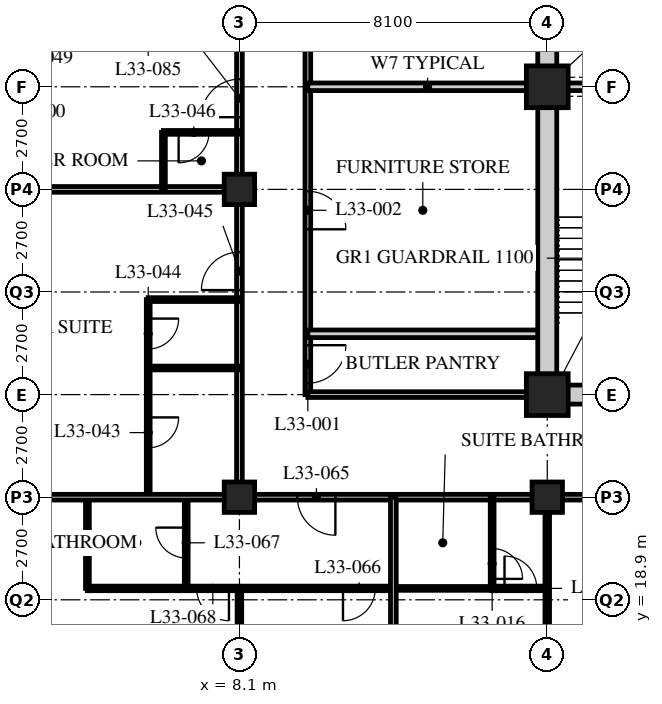
"""IFC4 building model, lengths in metres.
Left out: names, types, materials, properties, quantities, classifications, styles, units other than length and angle.
Written with IfcOpenShell. Run it as: python <this file> out.ifc"""

import sys

from ifc_helpers import new_model, si_unit, direction, frame, frame_2d, origin, origin_2d, place, context, subcontext, project, spatial, rectangle, hollow_rectangle, extrude, element, fill, save


model = new_model("IFC4")
c1 = context("Model", 3, precision=1e-05, world=origin(), true_north=direction((0.0, 1.0)))
c2 = subcontext(c1, "Body", "Model", "MODEL_VIEW")
j1 = project(units=[si_unit("LENGTHUNIT", "METRE"), si_unit("PLANEANGLEUNIT", "RADIAN")], contexts=[c1])
p1 = place(None, origin())
s1 = spatial("IfcSite", under=j1, at=p1, CompositionType="ELEMENT")
p2 = place(p1, origin())
s2 = spatial("IfcBuilding", under=s1, at=p2, CompositionType="ELEMENT")
p3 = place(p2, frame((0.0, 0.0, 130.6)))
s3 = spatial("IfcBuildingStorey", under=s2, at=p3, CompositionType="ELEMENT", Elevation=130.6)
for number, where, z_axis, x_axis in (
    (1, (8.1, 21.6, 0.0), (0.0, 0.0, 1.0), (1.0, 0.0, 0.0)),
    (2, (8.1, 29.7, 0.0), (0.0, 0.0, 1.0), (1.0, 0.0, 0.0)),
    (3, (16.2, 21.6, 0.0), (0.0, 0.0, 1.0), (1.0, 0.0, 0.0)),
):
    element("IfcColumn", number, at=place(p3, frame(where, z_axis=z_axis, x_axis=x_axis)), inside=s3, PredefinedType="COLUMN", context=c2, shape_type="SweptSolid", body=[
        extrude(hollow_rectangle(XDim=0.8, YDim=0.8, WallThickness=0.08, at=origin_2d()), origin(), (0.0, 0.0, 1.0), 3.4),
    ])
for number, where, z_axis, x_axis in (
    (4, (16.2, 24.3, 0.0), (0.0, 0.0, 1.0), (1.0, 0.0, 0.0)),
    (5, (16.2, 32.4, 0.0), (0.0, 0.0, 1.0), (1.0, 0.0, 0.0)),
):
    element("IfcColumn", number, at=place(p3, frame(where, z_axis=z_axis, x_axis=x_axis)), inside=s3, PredefinedType="COLUMN", context=c2, shape_type="SweptSolid", body=[
        extrude(hollow_rectangle(XDim=1.1, YDim=1.1, WallThickness=0.1, at=origin_2d()), origin(), (0.0, 0.0, 1.0), 3.4),
    ])
p4 = place(p3, frame((8.1, 21.6, 0.0), z_axis=(0.0, 0.0, 1.0), x_axis=(1.0, 0.0, 0.0)))
e6 = element("IfcWall", 6, at=p4, inside=s3, PredefinedType="PARTITIONING", context=c2, shape_type="SweptSolid", body=[
    extrude(rectangle(XDim=40.5, YDim=0.15, at=frame_2d((20.25, 0.0))), origin(), (0.0, 0.0, 1.0), 2.578),
])
p5 = place(p4, frame((9.625, 0.0, 0.0)))
e7 = element("IfcOpeningElement", 7, at=p5, cuts=e6, PredefinedType="OPENING", context=c2, shape_type="SweptSolid", body=[
    extrude(rectangle(XDim=1.0, YDim=2.1, at=frame_2d((0.5, 1.05))), frame((0.0, 0.085, 0.0), z_axis=(0.0, -1.0, 0.0), x_axis=(1.0, 0.0, 0.0)), (0.0, 0.0, 1.0), 0.17),
])
p6 = place(p4, frame((21.775, 0.0, 0.0)))
e8 = element("IfcOpeningElement", 8, at=p6, cuts=e6, PredefinedType="OPENING", context=c2, shape_type="SweptSolid", body=[
    extrude(rectangle(XDim=1.0, YDim=2.1, at=frame_2d((0.5, 1.05))), frame((0.0, 0.085, 0.0), z_axis=(0.0, -1.0, 0.0), x_axis=(1.0, 0.0, 0.0)), (0.0, 0.0, 1.0), 0.17),
])
p7 = place(p4, frame((28.95, 0.0, 0.0)))
e9 = element("IfcOpeningElement", 9, at=p7, cuts=e6, PredefinedType="OPENING", context=c2, shape_type="SweptSolid", body=[
    extrude(rectangle(XDim=1.0, YDim=2.1, at=frame_2d((0.5, 1.05))), frame((0.0, 0.085, 0.0), z_axis=(0.0, -1.0, 0.0), x_axis=(1.0, 0.0, 0.0)), (0.0, 0.0, 1.0), 0.17),
])
p8 = place(p4, frame((34.85, 0.0, 0.0)))
e10 = element("IfcOpeningElement", 10, at=p8, cuts=e6, PredefinedType="OPENING", context=c2, shape_type="SweptSolid", body=[
    extrude(rectangle(XDim=1.0, YDim=2.1, at=frame_2d((0.5, 1.05))), frame((0.0, 0.085, 0.0), z_axis=(0.0, -1.0, 0.0), x_axis=(1.0, 0.0, 0.0)), (0.0, 0.0, 1.0), 0.17),
])
p9 = place(p4, frame((1.525, 0.0, 0.0)))
e11 = element("IfcOpeningElement", 11, at=p9, cuts=e6, PredefinedType="OPENING", context=c2, shape_type="SweptSolid", body=[
    extrude(rectangle(XDim=1.0, YDim=2.1, at=frame_2d((0.5, 1.05))), frame((0.0, 0.085, 0.0), z_axis=(0.0, -1.0, 0.0), x_axis=(1.0, 0.0, 0.0)), (0.0, 0.0, 1.0), 0.17),
])
p10 = place(p4, frame((37.975, 0.0, 0.0)))
e12 = element("IfcOpeningElement", 12, at=p10, cuts=e6, PredefinedType="OPENING", context=c2, shape_type="SweptSolid", body=[
    extrude(rectangle(XDim=1.0, YDim=2.1, at=frame_2d((0.5, 1.05))), frame((0.0, 0.085, 0.0), z_axis=(0.0, -1.0, 0.0), x_axis=(1.0, 0.0, 0.0)), (0.0, 0.0, 1.0), 0.17),
])
p11 = place(p3, frame((8.1, 21.6, 0.0), z_axis=(0.0, 0.0, 1.0), x_axis=(0.0, 1.0, 0.0)))
e13 = element("IfcWall", 13, at=p11, inside=s3, PredefinedType="PARTITIONING", context=c2, shape_type="SweptSolid", body=[
    extrude(rectangle(XDim=24.3, YDim=0.15, at=frame_2d((12.15, 0.0))), origin(), (0.0, 0.0, 1.0), 2.578),
])
p12 = place(p11, frame((5.45, 0.0, 0.0)))
e14 = element("IfcOpeningElement", 14, at=p12, cuts=e13, PredefinedType="OPENING", context=c2, shape_type="SweptSolid", body=[
    extrude(rectangle(XDim=1.0, YDim=2.1, at=frame_2d((0.5, 1.05))), frame((0.0, 0.085, 0.0), z_axis=(0.0, -1.0, 0.0), x_axis=(1.0, 0.0, 0.0)), (0.0, 0.0, 1.0), 0.17),
])
p13 = place(p11, frame((10.0, 0.0, 0.0)))
e15 = element("IfcOpeningElement", 15, at=p13, cuts=e13, PredefinedType="OPENING", context=c2, shape_type="SweptSolid", body=[
    extrude(rectangle(XDim=1.0, YDim=2.1, at=frame_2d((0.5, 1.05))), frame((0.0, 0.085, 0.0), z_axis=(0.0, -1.0, 0.0), x_axis=(1.0, 0.0, 0.0)), (0.0, 0.0, 1.0), 0.17),
])
p14 = place(p11, frame((21.65, 0.0, 0.0)))
e16 = element("IfcOpeningElement", 16, at=p14, cuts=e13, PredefinedType="OPENING", context=c2, shape_type="SweptSolid", body=[
    extrude(rectangle(XDim=1.0, YDim=2.1, at=frame_2d((0.5, 1.05))), frame((0.0, 0.085, 0.0), z_axis=(0.0, -1.0, 0.0), x_axis=(1.0, 0.0, 0.0)), (0.0, 0.0, 1.0), 0.17),
])
p15 = place(p3, frame((9.9, 44.1, 0.0), z_axis=(0.0, 0.0, 1.0), x_axis=(0.0, -1.0, 0.0)))
e17 = element("IfcWall", 17, at=p15, inside=s3, PredefinedType="PARTITIONING", context=c2, shape_type="SweptSolid", body=[
    extrude(rectangle(XDim=19.8, YDim=0.15, at=frame_2d((9.9, 0.0))), origin(), (0.0, 0.0, 1.0), 3.19),
])
p16 = place(p15, frame((18.5, 0.0, 0.0)))
e18 = element("IfcOpeningElement", 18, at=p16, cuts=e17, PredefinedType="OPENING", context=c2, shape_type="SweptSolid", body=[
    extrude(rectangle(XDim=1.0, YDim=2.1, at=frame_2d((0.5, 1.05))), frame((0.0, 0.085, 0.0), z_axis=(0.0, -1.0, 0.0), x_axis=(1.0, 0.0, 0.0)), (0.0, 0.0, 1.0), 0.17),
])
p17 = place(p15, frame((14.45, 0.0, 0.0)))
e19 = element("IfcOpeningElement", 19, at=p17, cuts=e17, PredefinedType="OPENING", context=c2, shape_type="SweptSolid", body=[
    extrude(rectangle(XDim=1.0, YDim=2.1, at=frame_2d((0.5, 1.05))), frame((0.0, 0.085, 0.0), z_axis=(0.0, -1.0, 0.0), x_axis=(1.0, 0.0, 0.0)), (0.0, 0.0, 1.0), 0.17),
])
p18 = place(p15, frame((7.15, 0.0, 0.0)))
e20 = element("IfcOpeningElement", 20, at=p18, cuts=e17, PredefinedType="OPENING", context=c2, shape_type="SweptSolid", body=[
    extrude(rectangle(XDim=1.0, YDim=2.1, at=frame_2d((0.5, 1.05))), frame((0.0, 0.085, 0.0), z_axis=(0.0, -1.0, 0.0), x_axis=(1.0, 0.0, 0.0)), (0.0, 0.0, 1.0), 0.17),
])
p19 = place(p3, frame((9.9, 24.3, 0.0), z_axis=(0.0, 0.0, 1.0), x_axis=(1.0, 0.0, 0.0)))
e21 = element("IfcWall", 21, at=p19, inside=s3, PredefinedType="PARTITIONING", context=c2, shape_type="SweptSolid", body=[
    extrude(rectangle(XDim=6.1, YDim=0.15, at=frame_2d((3.05, 0.0))), origin(), (0.0, 0.0, 1.0), 3.19),
])
for number, where, z_axis, x_axis in (
    (22, (9.9, 32.4, 0.0), (0.0, 0.0, 1.0), (1.0, 0.0, 0.0)),
    (23, (9.9, 25.9, 0.0), (0.0, 0.0, 1.0), (1.0, 0.0, 0.0)),
):
    element("IfcWall", number, at=place(p3, frame(where, z_axis=z_axis, x_axis=x_axis)), inside=s3, PredefinedType="SOLIDWALL", context=c2, shape_type="SweptSolid", body=[
        extrude(rectangle(XDim=6.3, YDim=0.2, at=frame_2d((3.15, 0.0))), origin(), (0.0, 0.0, 1.0), 3.19),
    ])
p20 = place(p3, frame((12.15, 19.2, 0.0), z_axis=(0.0, 0.0, 1.0), x_axis=(1.0, 0.0, 0.0)))
e24 = element("IfcWall", 24, at=p20, inside=s3, PredefinedType="PARTITIONING", context=c2, shape_type="SweptSolid", body=[
    extrude(rectangle(XDim=2.6, YDim=0.1, at=frame_2d((1.3, 0.0))), origin(), (0.0, 0.0, 1.0), 3.19),
])
p21 = place(p3, frame((14.75, 21.6, 0.0), z_axis=(0.0, 0.0, 1.0), x_axis=(0.0, -1.0, 0.0)))
e25 = element("IfcWall", 25, at=p21, inside=s3, PredefinedType="PARTITIONING", context=c2, shape_type="SweptSolid", body=[
    extrude(rectangle(XDim=2.4, YDim=0.1, at=frame_2d((1.2, 0.0))), origin(), (0.0, 0.0, 1.0), 3.19),
])
p22 = place(p21, frame((1.35, 0.0, 0.0)))
e26 = element("IfcOpeningElement", 26, at=p22, cuts=e25, PredefinedType="OPENING", context=c2, shape_type="SweptSolid", body=[
    extrude(rectangle(XDim=0.8, YDim=2.1, at=frame_2d((0.4, 1.05))), frame((0.0, 0.06, 0.0), z_axis=(0.0, -1.0, 0.0), x_axis=(1.0, 0.0, 0.0)), (0.0, 0.0, 1.0), 0.12),
])
p23 = place(p3, frame((16.2, 21.6, 0.0), z_axis=(0.0, 0.0, 1.0), x_axis=(0.0, -1.0, 0.0)))
e27 = element("IfcWall", 27, at=p23, inside=s3, PredefinedType="PARTITIONING", context=c2, shape_type="SweptSolid", body=[
    extrude(rectangle(XDim=15.9, YDim=0.12, at=frame_2d((7.95, 0.0))), origin(), (0.0, 0.0, 1.0), 2.578),
])
p24 = place(p23, frame((8.875, 0.0, 0.0)))
e28 = element("IfcOpeningElement", 28, at=p24, cuts=e27, PredefinedType="OPENING", context=c2, shape_type="SweptSolid", body=[
    extrude(rectangle(XDim=0.85, YDim=2.1, at=frame_2d((0.425, 1.05))), frame((0.0, 0.07, 0.0), z_axis=(0.0, -1.0, 0.0), x_axis=(1.0, 0.0, 0.0)), (0.0, 0.0, 1.0), 0.14),
])
p25 = place(p3, frame((5.7, 21.6, 0.0), z_axis=(0.0, 0.0, 1.0), x_axis=(0.0, 1.0, 0.0)))
e29 = element("IfcWall", 29, at=p25, inside=s3, PredefinedType="PARTITIONING", context=c2, shape_type="SweptSolid", body=[
    extrude(rectangle(XDim=5.2, YDim=0.1, at=frame_2d((2.6, 0.0))), origin(), (0.0, 0.0, 1.0), 3.19),
])
p26 = place(p25, frame((1.3, 0.0, 0.0)))
e30 = element("IfcOpeningElement", 30, at=p26, cuts=e29, PredefinedType="OPENING", context=c2, shape_type="SweptSolid", body=[
    extrude(rectangle(XDim=0.8, YDim=2.1, at=frame_2d((0.4, 1.05))), frame((0.0, 0.06, 0.0), z_axis=(0.0, -1.0, 0.0), x_axis=(1.0, 0.0, 0.0)), (0.0, 0.0, 1.0), 0.12),
])
p27 = place(p25, frame((3.9, 0.0, 0.0)))
e31 = element("IfcOpeningElement", 31, at=p27, cuts=e29, PredefinedType="OPENING", context=c2, shape_type="SweptSolid", body=[
    extrude(rectangle(XDim=0.8, YDim=2.1, at=frame_2d((0.4, 1.05))), frame((0.0, 0.06, 0.0), z_axis=(0.0, -1.0, 0.0), x_axis=(1.0, 0.0, 0.0)), (0.0, 0.0, 1.0), 0.12),
])
for number, where, z_axis, x_axis in (
    (32, (8.1, 25.0, 0.0), (0.0, 0.0, 1.0), (-1.0, 0.0, 0.0)),
    (33, (8.1, 26.8, 0.0), (0.0, 0.0, 1.0), (-1.0, 0.0, 0.0)),
):
    element("IfcWall", number, at=place(p3, frame(where, z_axis=z_axis, x_axis=x_axis)), inside=s3, PredefinedType="PARTITIONING", context=c2, shape_type="SweptSolid", body=[
        extrude(rectangle(XDim=2.4, YDim=0.1, at=frame_2d((1.2, 0.0))), origin(), (0.0, 0.0, 1.0), 3.19),
    ])
p28 = place(p3, frame((8.1, 29.7, 0.0), z_axis=(0.0, 0.0, 1.0), x_axis=(-1.0, 0.0, 0.0)))
e34 = element("IfcWall", 34, at=p28, inside=s3, PredefinedType="PARTITIONING", context=c2, shape_type="SweptSolid", body=[
    extrude(rectangle(XDim=7.8, YDim=0.15, at=frame_2d((3.9, 0.0))), origin(), (0.0, 0.0, 1.0), 2.578),
])
p29 = place(p3, frame((6.1, 29.7, 0.0), z_axis=(0.0, 0.0, 1.0), x_axis=(0.0, 1.0, 0.0)))
e35 = element("IfcWall", 35, at=p29, inside=s3, PredefinedType="PARTITIONING", context=c2, shape_type="SweptSolid", body=[
    extrude(rectangle(XDim=1.5, YDim=0.1, at=frame_2d((0.75, 0.0))), origin(), (0.0, 0.0, 1.0), 3.19),
])
p30 = place(p3, frame((8.1, 31.2, 0.0), z_axis=(0.0, 0.0, 1.0), x_axis=(-1.0, 0.0, 0.0)))
e36 = element("IfcWall", 36, at=p30, inside=s3, PredefinedType="PARTITIONING", context=c2, shape_type="SweptSolid", body=[
    extrude(rectangle(XDim=2.0, YDim=0.1, at=frame_2d((1.0, 0.0))), origin(), (0.0, 0.0, 1.0), 3.19),
])
p31 = place(p30, frame((0.8, 0.0, 0.0)))
e37 = element("IfcOpeningElement", 37, at=p31, cuts=e36, PredefinedType="OPENING", context=c2, shape_type="SweptSolid", body=[
    extrude(rectangle(XDim=0.8, YDim=2.1, at=frame_2d((0.4, 1.05))), frame((0.0, 0.06, 0.0), z_axis=(0.0, -1.0, 0.0), x_axis=(1.0, 0.0, 0.0)), (0.0, 0.0, 1.0), 0.12),
])
p32 = place(p3, frame((6.7, 21.6, 0.0), z_axis=(0.0, 0.0, 1.0), x_axis=(0.0, -1.0, 0.0)))
e38 = element("IfcWall", 38, at=p32, inside=s3, PredefinedType="PARTITIONING", context=c2, shape_type="SweptSolid", body=[
    extrude(rectangle(XDim=2.4, YDim=0.1, at=frame_2d((1.2, 0.0))), origin(), (0.0, 0.0, 1.0), 3.19),
])
p33 = place(p32, frame((0.8, 0.0, 0.0)))
e39 = element("IfcOpeningElement", 39, at=p33, cuts=e38, PredefinedType="OPENING", context=c2, shape_type="SweptSolid", body=[
    extrude(rectangle(XDim=0.8, YDim=2.1, at=frame_2d((0.4, 1.05))), frame((0.0, 0.06, 0.0), z_axis=(0.0, -1.0, 0.0), x_axis=(1.0, 0.0, 0.0)), (0.0, 0.0, 1.0), 0.12),
])
p34 = place(p3, frame((4.1, 21.6, 0.0), z_axis=(0.0, 0.0, 1.0), x_axis=(0.0, -1.0, 0.0)))
e40 = element("IfcWall", 40, at=p34, inside=s3, PredefinedType="PARTITIONING", context=c2, shape_type="SweptSolid", body=[
    extrude(rectangle(XDim=2.4, YDim=0.1, at=frame_2d((1.2, 0.0))), origin(), (0.0, 0.0, 1.0), 3.19),
])
p35 = place(p3, frame((4.1, 19.2, 0.0), z_axis=(0.0, 0.0, 1.0), x_axis=(1.0, 0.0, 0.0)))
e41 = element("IfcWall", 41, at=p35, inside=s3, PredefinedType="PARTITIONING", context=c2, shape_type="SweptSolid", body=[
    extrude(rectangle(XDim=8.05, YDim=0.12, at=frame_2d((4.025, 0.0))), origin(), (0.0, 0.0, 1.0), 3.19),
])
p36 = place(p35, frame((6.725, 0.0, 0.0)))
e42 = element("IfcOpeningElement", 42, at=p36, cuts=e41, PredefinedType="OPENING", context=c2, shape_type="SweptSolid", body=[
    extrude(rectangle(XDim=0.85, YDim=2.1, at=frame_2d((0.425, 1.05))), frame((0.0, 0.07, 0.0), z_axis=(0.0, -1.0, 0.0), x_axis=(1.0, 0.0, 0.0)), (0.0, 0.0, 1.0), 0.14),
])
p37 = place(p35, frame((2.875, 0.0, 0.0)))
e43 = element("IfcOpeningElement", 43, at=p37, cuts=e41, PredefinedType="OPENING", context=c2, shape_type="SweptSolid", body=[
    extrude(rectangle(XDim=0.85, YDim=2.1, at=frame_2d((0.425, 1.05))), frame((0.0, 0.07, 0.0), z_axis=(0.0, -1.0, 0.0), x_axis=(1.0, 0.0, 0.0)), (0.0, 0.0, 1.0), 0.14),
])
p38 = place(p3, frame((8.1, 19.2, 0.0), z_axis=(0.0, 0.0, 1.0), x_axis=(0.0, -1.0, 0.0)))
e44 = element("IfcWall", 44, at=p38, inside=s3, PredefinedType="PARTITIONING", context=c2, shape_type="SweptSolid", body=[
    extrude(rectangle(XDim=9.45, YDim=0.12, at=frame_2d((4.725, 0.0))), origin(), (0.0, 0.0, 1.0), 2.578),
])
p39 = place(p3, frame((0.3, 21.6, 0.0), z_axis=(0.0, 0.0, 1.0), x_axis=(1.0, 0.0, 0.0)))
e45 = element("IfcWall", 45, at=p39, inside=s3, PredefinedType="PARTITIONING", context=c2, shape_type="SweptSolid", body=[
    extrude(rectangle(XDim=7.8, YDim=0.15, at=frame_2d((3.9, 0.0))), origin(), (0.0, 0.0, 1.0), 2.578),
])
p40 = place(p3, frame((12.15, 21.6, 0.0), z_axis=(0.0, 0.0, 1.0), x_axis=(0.0, -1.0, 0.0)))
e46 = element("IfcWall", 46, at=p40, inside=s3, PredefinedType="PARTITIONING", context=c2, shape_type="SweptSolid", body=[
    extrude(rectangle(XDim=15.9, YDim=0.15, at=frame_2d((7.95, 0.0))), origin(), (0.0, 0.0, 1.0), 3.19),
])
p41 = place(p3, frame((16.2, 19.2, 0.0), z_axis=(0.0, 0.0, 1.0), x_axis=(-1.0, 0.0, 0.0)))
e47 = element("IfcWall", 47, at=p41, inside=s3, PredefinedType="PARTITIONING", context=c2, shape_type="SweptSolid", body=[
    extrude(rectangle(XDim=1.46, YDim=0.12, at=frame_2d((0.73, 0.0))), origin(), (0.0, 0.0, 1.0), 3.19),
])
p42 = place(p41, frame((0.275, 0.0, 0.0)))
e48 = element("IfcOpeningElement", 48, at=p42, cuts=e47, PredefinedType="OPENING", context=c2, shape_type="SweptSolid", body=[
    extrude(rectangle(XDim=0.85, YDim=2.1, at=frame_2d((0.425, 1.05))), frame((0.0, 0.07, 0.0), z_axis=(0.0, -1.0, 0.0), x_axis=(1.0, 0.0, 0.0)), (0.0, 0.0, 1.0), 0.14),
])
p43 = place(p3, frame((15.95, 24.3, 0.0), z_axis=(0.0, 0.0, 1.0), x_axis=(1.0, 0.0, 0.0)))
e49 = element("IfcWall", 49, at=p43, inside=s3, PredefinedType="SOLIDWALL", context=c2, shape_type="SweptSolid", body=[
    extrude(rectangle(XDim=24.8, YDim=0.5, at=frame_2d((12.4, 0.0))), origin(), (0.0, 0.0, 1.0), 2.54),
])
p44 = place(p43, frame((11.5, 0.0, 0.0)))
e50 = element("IfcOpeningElement", 50, at=p44, cuts=e49, PredefinedType="OPENING", context=c2, shape_type="SweptSolid", body=[
    extrude(rectangle(XDim=1.8, YDim=2.4, at=frame_2d((0.9, 1.2))), frame((0.0, 0.26, 0.0), z_axis=(0.0, -1.0, 0.0), x_axis=(1.0, 0.0, 0.0)), (0.0, 0.0, 1.0), 0.52),
])
p45 = place(p3, frame((16.2, 24.55, 0.0), z_axis=(0.0, 0.0, 1.0), x_axis=(0.0, 1.0, 0.0)))
e51 = element("IfcWall", 51, at=p45, inside=s3, PredefinedType="SOLIDWALL", context=c2, shape_type="SweptSolid", body=[
    extrude(rectangle(XDim=15.7, YDim=0.5, at=frame_2d((7.85, 0.0))), origin(), (0.0, 0.0, 1.0), 2.578),
])
p46 = place(p3, frame((16.45, 32.4, 0.0), z_axis=(0.0, 0.0, 1.0), x_axis=(1.0, 0.0, 0.0)))
e52 = element("IfcWall", 52, at=p46, inside=s3, PredefinedType="SOLIDWALL", context=c2, shape_type="SweptSolid", body=[
    extrude(rectangle(XDim=7.95, YDim=0.2, at=frame_2d((3.975, 0.0))), origin(), (0.0, 0.0, 1.0), 2.578),
])
p47 = place(p16, origin())
e53 = element("IfcDoor", 53, at=p47, inside=s3, OperationType="SINGLE_SWING_LEFT", PredefinedType="DOOR", context=c2, shape_type="SweptSolid", body=[
    extrude(rectangle(XDim=1.0, YDim=2.1, at=frame_2d((0.5, 1.05))), frame((0.0, 0.025, 0.0), z_axis=(0.0, -1.0, 0.0), x_axis=(1.0, 0.0, 0.0)), (0.0, 0.0, 1.0), 0.05),
])
fill(e18, e53)
p48 = place(p17, origin())
e54 = element("IfcDoor", 54, at=p48, inside=s3, OperationType="SINGLE_SWING_RIGHT", PredefinedType="DOOR", context=c2, shape_type="SweptSolid", body=[
    extrude(rectangle(XDim=1.0, YDim=2.1, at=frame_2d((0.5, 1.05))), frame((0.0, 0.025, 0.0), z_axis=(0.0, -1.0, 0.0), x_axis=(1.0, 0.0, 0.0)), (0.0, 0.0, 1.0), 0.05),
])
fill(e19, e54)
p49 = place(p22, origin())
e55 = element("IfcDoor", 55, at=p49, inside=s3, OperationType="SINGLE_SWING_RIGHT", PredefinedType="DOOR", context=c2, shape_type="SweptSolid", body=[
    extrude(rectangle(XDim=0.8, YDim=2.1, at=frame_2d((0.4, 1.05))), frame((0.0, 0.025, 0.0), z_axis=(0.0, -1.0, 0.0), x_axis=(1.0, 0.0, 0.0)), (0.0, 0.0, 1.0), 0.05),
])
fill(e26, e55)
p50 = place(p26, origin())
e56 = element("IfcDoor", 56, at=p50, inside=s3, OperationType="SINGLE_SWING_LEFT", PredefinedType="DOOR", context=c2, shape_type="SweptSolid", body=[
    extrude(rectangle(XDim=0.8, YDim=2.1, at=frame_2d((0.4, 1.05))), frame((0.0, 0.025, 0.0), z_axis=(0.0, -1.0, 0.0), x_axis=(1.0, 0.0, 0.0)), (0.0, 0.0, 1.0), 0.05),
])
fill(e30, e56)
p51 = place(p27, origin())
e57 = element("IfcDoor", 57, at=p51, inside=s3, OperationType="SINGLE_SWING_LEFT", PredefinedType="DOOR", context=c2, shape_type="SweptSolid", body=[
    extrude(rectangle(XDim=0.8, YDim=2.1, at=frame_2d((0.4, 1.05))), frame((0.0, 0.025, 0.0), z_axis=(0.0, -1.0, 0.0), x_axis=(1.0, 0.0, 0.0)), (0.0, 0.0, 1.0), 0.05),
])
fill(e31, e57)
p52 = place(p12, origin())
e58 = element("IfcDoor", 58, at=p52, inside=s3, OperationType="SINGLE_SWING_LEFT", PredefinedType="DOOR", context=c2, shape_type="SweptSolid", body=[
    extrude(rectangle(XDim=1.0, YDim=2.1, at=frame_2d((0.5, 1.05))), frame((0.0, 0.025, 0.0), z_axis=(0.0, -1.0, 0.0), x_axis=(1.0, 0.0, 0.0)), (0.0, 0.0, 1.0), 0.05),
])
fill(e14, e58)
p53 = place(p31, origin())
e59 = element("IfcDoor", 59, at=p53, inside=s3, OperationType="SINGLE_SWING_RIGHT", PredefinedType="DOOR", context=c2, shape_type="SweptSolid", body=[
    extrude(rectangle(XDim=0.8, YDim=2.1, at=frame_2d((0.4, 1.05))), frame((0.0, 0.025, 0.0), z_axis=(0.0, -1.0, 0.0), x_axis=(1.0, 0.0, 0.0)), (0.0, 0.0, 1.0), 0.05),
])
fill(e37, e59)
p54 = place(p13, origin())
e60 = element("IfcDoor", 60, at=p54, inside=s3, OperationType="SINGLE_SWING_LEFT", PredefinedType="DOOR", context=c2, shape_type="SweptSolid", body=[
    extrude(rectangle(XDim=1.0, YDim=2.1, at=frame_2d((0.5, 1.05))), frame((0.0, 0.025, 0.0), z_axis=(0.0, -1.0, 0.0), x_axis=(1.0, 0.0, 0.0)), (0.0, 0.0, 1.0), 0.05),
])
fill(e15, e60)
p55 = place(p9, origin())
e61 = element("IfcDoor", 61, at=p55, inside=s3, OperationType="SINGLE_SWING_LEFT", PredefinedType="DOOR", context=c2, shape_type="SweptSolid", body=[
    extrude(rectangle(XDim=1.0, YDim=2.1, at=frame_2d((0.5, 1.05))), frame((0.0, 0.025, 0.0), z_axis=(0.0, -1.0, 0.0), x_axis=(1.0, 0.0, 0.0)), (0.0, 0.0, 1.0), 0.05),
])
fill(e11, e61)
p56 = place(p36, origin())
e62 = element("IfcDoor", 62, at=p56, inside=s3, OperationType="SINGLE_SWING_RIGHT", PredefinedType="DOOR", context=c2, shape_type="SweptSolid", body=[
    extrude(rectangle(XDim=0.85, YDim=2.1, at=frame_2d((0.425, 1.05))), frame((0.0, 0.025, 0.0), z_axis=(0.0, -1.0, 0.0), x_axis=(1.0, 0.0, 0.0)), (0.0, 0.0, 1.0), 0.05),
])
fill(e42, e62)
p57 = place(p33, origin())
e63 = element("IfcDoor", 63, at=p57, inside=s3, OperationType="SINGLE_SWING_RIGHT", PredefinedType="DOOR", context=c2, shape_type="SweptSolid", body=[
    extrude(rectangle(XDim=0.8, YDim=2.1, at=frame_2d((0.4, 1.05))), frame((0.0, 0.025, 0.0), z_axis=(0.0, -1.0, 0.0), x_axis=(1.0, 0.0, 0.0)), (0.0, 0.0, 1.0), 0.05),
])
fill(e39, e63)
p58 = place(p37, origin())
e64 = element("IfcDoor", 64, at=p58, inside=s3, OperationType="SINGLE_SWING_LEFT", PredefinedType="DOOR", context=c2, shape_type="SweptSolid", body=[
    extrude(rectangle(XDim=0.85, YDim=2.1, at=frame_2d((0.425, 1.05))), frame((0.0, 0.025, 0.0), z_axis=(0.0, -1.0, 0.0), x_axis=(1.0, 0.0, 0.0)), (0.0, 0.0, 1.0), 0.05),
])
fill(e43, e64)
p59 = place(p42, origin())
e65 = element("IfcDoor", 65, at=p59, inside=s3, OperationType="SINGLE_SWING_LEFT", PredefinedType="DOOR", context=c2, shape_type="SweptSolid", body=[
    extrude(rectangle(XDim=0.85, YDim=2.1, at=frame_2d((0.425, 1.05))), frame((0.0, 0.025, 0.0), z_axis=(0.0, -1.0, 0.0), x_axis=(1.0, 0.0, 0.0)), (0.0, 0.0, 1.0), 0.05),
])
fill(e48, e65)
save(model, sys.argv[1])
